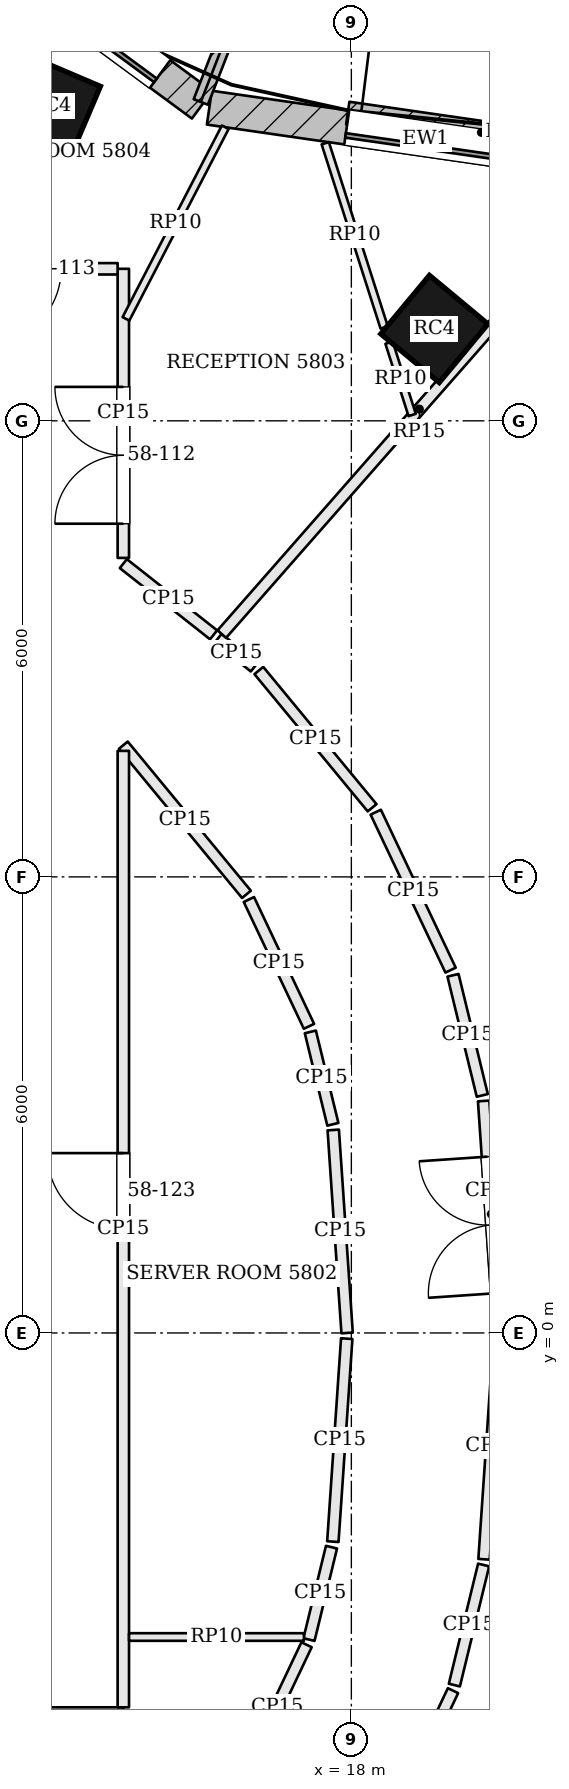
"""IFC4 building model, lengths in metres.
Left out: names, types, materials, properties, quantities, classifications, styles, units other than length and angle.
Written with IfcOpenShell. Run it as: python <this file> out.ifc"""

import sys

from ifc_helpers import new_model, si_unit, direction, frame, frame_2d, origin, origin_2d, place, context, subcontext, project, spatial, rectangle, extrude, element, fill, save


model = new_model("IFC4")
c1 = context("Model", 3, precision=1e-05, world=origin(), true_north=direction((0.0, 1.0)))
c2 = subcontext(c1, "Body", "Model", "MODEL_VIEW")
j1 = project(units=[si_unit("LENGTHUNIT", "METRE"), si_unit("PLANEANGLEUNIT", "RADIAN")], contexts=[c1])
p1 = place(None, origin())
s1 = spatial("IfcSite", under=j1, at=p1, CompositionType="ELEMENT")
p2 = place(p1, origin())
s2 = spatial("IfcBuilding", under=s1, at=p2, CompositionType="ELEMENT")
p3 = place(p2, frame((0.0, 0.0, 237.0)))
s3 = spatial("IfcBuildingStorey", under=s2, at=p3, CompositionType="ELEMENT", Elevation=237.0)
for number, where, z_axis, x_axis in (
    (1, (19.092, 13.209, 0.0), (0.0, 0.0, 1.0), (-0.769, 0.639, 0.0)),
    (2, (14.042, 16.136, 0.0), (0.0, 0.0, 1.0), (-0.92, 0.392, 0.0)),
):
    element("IfcColumn", number, at=place(p3, frame(where, z_axis=z_axis, x_axis=x_axis)), inside=s3, PredefinedType="COLUMN", context=c2, shape_type="SweptSolid", body=[
        extrude(rectangle(XDim=1.0, YDim=1.0, at=origin_2d()), origin(), (0.0, 0.0, 1.0), 3.9),
    ])
p4 = place(p3, frame((21.825, 15.297, 0.0), z_axis=(0.0, 0.0, 1.0), x_axis=(-0.98971474215, 0.143054986527, 0.0)))
e3 = element("IfcWall", 3, at=p4, inside=s3, PredefinedType="SOLIDWALL", context=c2, shape_type="SweptSolid", body=[
    extrude(rectangle(XDim=5.753, YDim=0.45, at=frame_2d((2.876, 0.0))), origin(), (0.0, 0.0, 1.0), 3.7),
])
p5 = place(p4, frame((1.826, 0.0, 0.9)))
e4 = element("IfcOpeningElement", 4, at=p5, cuts=e3, PredefinedType="OPENING", context=c2, shape_type="SweptSolid", body=[
    extrude(rectangle(XDim=2.1, YDim=2.3, at=frame_2d((1.05, 1.15))), frame((0.0, 0.235, 0.0), z_axis=(0.0, -1.0, 0.0), x_axis=(1.0, 0.0, 0.0)), (0.0, 0.0, 1.0), 0.47),
])
p6 = place(p3, frame((16.036, 16.158, 0.0), z_axis=(0.0, 0.0, 1.0), x_axis=(-0.805181432967, 0.593028549064, 0.0)))
e5 = element("IfcWall", 5, at=p6, inside=s3, PredefinedType="SOLIDWALL", context=c2, shape_type="SweptSolid", body=[
    extrude(rectangle(XDim=3.469, YDim=0.45, at=frame_2d((1.734, 0.0))), origin(), (0.0, 0.0, 1.0), 3.7),
])
p7 = place(p6, frame((0.684, 0.0, 0.9)))
e6 = element("IfcOpeningElement", 6, at=p7, cuts=e5, PredefinedType="OPENING", context=c2, shape_type="SweptSolid", body=[
    extrude(rectangle(XDim=2.1, YDim=2.3, at=frame_2d((1.05, 1.15))), frame((0.0, 0.235, 0.0), z_axis=(0.0, -1.0, 0.0), x_axis=(1.0, 0.0, 0.0)), (0.0, 0.0, 1.0), 0.47),
])
p8 = place(p3, frame((16.019, 16.195, 0.0), z_axis=(0.0, 0.0, 1.0), x_axis=(0.362641522028, 0.931928713208, 0.0)))
e7 = element("IfcWall", 7, at=p8, inside=s3, PredefinedType="SOLIDWALL", context=c2, shape_type="SweptSolid", body=[
    extrude(rectangle(XDim=1.75, YDim=0.2, at=frame_2d((0.875, 0.0))), origin(), (0.0, 0.0, 1.0), 3.7),
])
p9 = place(p3, frame((21.471, 15.541, 3.9), z_axis=(0.0, 0.0, 1.0), x_axis=(-0.989713234374, 0.143065417571, 0.0)))
e8 = element("IfcWall", 8, at=p9, inside=s3, PredefinedType="PARAPET", context=c2, shape_type="SweptSolid", body=[
    extrude(rectangle(XDim=3.555, YDim=0.3, at=frame_2d((1.777, 0.0))), origin(), (0.0, 0.0, 1.0), 1.1),
])
p10 = place(p3, frame((18.353, -6.784, 0.0), z_axis=(0.0, 0.0, 1.0), x_axis=(0.428086344739, 0.903737838894, 0.0)))
e9 = element("IfcWall", 9, at=p10, inside=s3, PredefinedType="PARTITIONING", context=c2, shape_type="SweptSolid", body=[
    extrude(rectangle(XDim=2.3, YDim=0.15, at=frame_2d((1.15, 0.0))), origin(), (0.0, 0.0, 1.0), 3.084),
])
p11 = place(p3, frame((19.355, -4.633, 0.0), z_axis=(0.0, 0.0, 1.0), x_axis=(0.236703930685, 0.971581828359, 0.0)))
e10 = element("IfcWall", 10, at=p11, inside=s3, PredefinedType="PARTITIONING", context=c2, shape_type="SweptSolid", body=[
    extrude(rectangle(XDim=1.626, YDim=0.15, at=frame_2d((0.813, 0.0))), origin(), (0.0, 0.0, 1.0), 3.084),
])
p12 = place(p3, frame((19.745, -2.978, 0.0), z_axis=(0.0, 0.0, 1.0), x_axis=(0.068142324, 0.997675610447, 0.0)))
e11 = element("IfcWall", 11, at=p12, inside=s3, PredefinedType="PARTITIONING", context=c2, shape_type="SweptSolid", body=[
    extrude(rectangle(XDim=2.984, YDim=0.15, at=frame_2d((1.492, 0.0))), origin(), (0.0, 0.0, 1.0), 3.084),
])
p13 = place(p3, frame((19.944, 0.075, 0.0), z_axis=(0.0, 0.0, 1.0), x_axis=(-0.068136763128, 0.997675990245, 0.0)))
e12 = element("IfcWall", 12, at=p13, inside=s3, PredefinedType="PARTITIONING", context=c2, shape_type="SweptSolid", body=[
    extrude(rectangle(XDim=2.985, YDim=0.15, at=frame_2d((1.492, 0.0))), origin(), (0.0, 0.0, 1.0), 3.084),
])
p14 = place(p13, frame((0.45, 0.0, 0.0)))
e13 = element("IfcOpeningElement", 13, at=p14, cuts=e12, PredefinedType="OPENING", context=c2, shape_type="SweptSolid", body=[
    extrude(rectangle(XDim=1.8, YDim=2.1, at=frame_2d((0.9, 1.05))), frame((0.0, 0.085, 0.0), z_axis=(0.0, -1.0, 0.0), x_axis=(1.0, 0.0, 0.0)), (0.0, 0.0, 1.0), 0.17),
])
p15 = place(p3, frame((19.722, 3.125, 0.0), z_axis=(0.0, 0.0, 1.0), x_axis=(-0.236703930685, 0.971581828359, 0.0)))
e14 = element("IfcWall", 14, at=p15, inside=s3, PredefinedType="PARTITIONING", context=c2, shape_type="SweptSolid", body=[
    extrude(rectangle(XDim=1.626, YDim=0.15, at=frame_2d((0.813, 0.0))), origin(), (0.0, 0.0, 1.0), 3.084),
])
p16 = place(p3, frame((19.305, 4.773, 0.0), z_axis=(0.0, 0.0, 1.0), x_axis=(-0.428173054138, 0.903696760927, 0.0)))
e15 = element("IfcWall", 15, at=p16, inside=s3, PredefinedType="PARTITIONING", context=c2, shape_type="SweptSolid", body=[
    extrude(rectangle(XDim=2.3, YDim=0.15, at=frame_2d((1.15, 0.0))), origin(), (0.0, 0.0, 1.0), 3.084),
])
p17 = place(p3, frame((18.273, 6.909, 0.0), z_axis=(0.0, 0.0, 1.0), x_axis=(-0.63653648943, 0.771246586783, 0.0)))
e16 = element("IfcWall", 16, at=p17, inside=s3, PredefinedType="PARTITIONING", context=c2, shape_type="SweptSolid", body=[
    extrude(rectangle(XDim=2.342, YDim=0.15, at=frame_2d((1.171, 0.0))), origin(), (0.0, 0.0, 1.0), 3.084),
])
p18 = place(p3, frame((16.724, 8.761, 0.0), z_axis=(0.0, 0.0, 1.0), x_axis=(-0.785119021736, 0.619344913363, 0.0)))
e17 = element("IfcWall", 17, at=p18, inside=s3, PredefinedType="PARTITIONING", context=c2, shape_type="SweptSolid", body=[
    extrude(rectangle(XDim=0.608, YDim=0.15, at=frame_2d((0.304, 0.0))), origin(), (0.0, 0.0, 1.0), 3.084),
])
p19 = place(p3, frame((21.493, 15.114, 0.0), z_axis=(0.0, 0.0, 1.0), x_axis=(-0.659778549164, -0.751460089467, 0.0)))
e18 = element("IfcWall", 18, at=p19, inside=s3, PredefinedType="PARTITIONING", context=c2, shape_type="SweptSolid", body=[
    extrude(rectangle(XDim=7.877, YDim=0.15, at=frame_2d((3.938, 0.0))), origin(), (0.0, 0.0, 1.0), 3.184),
])
p20 = place(p3, frame((16.188, 9.185, 0.0), z_axis=(0.0, 0.0, 1.0), x_axis=(-0.785118219188, 0.61934593072, 0.0)))
e19 = element("IfcWall", 19, at=p20, inside=s3, PredefinedType="PARTITIONING", context=c2, shape_type="SweptSolid", body=[
    extrude(rectangle(XDim=1.512, YDim=0.15, at=frame_2d((0.756, 0.0))), origin(), (0.0, 0.0, 1.0), 3.084),
])
p21 = place(p3, frame((15.0, 10.196, 0.0), z_axis=(0.0, 0.0, 1.0), x_axis=(0.0, 1.0, 0.0)))
e20 = element("IfcWall", 20, at=p21, inside=s3, PredefinedType="PARTITIONING", context=c2, shape_type="SweptSolid", body=[
    extrude(rectangle(XDim=3.804, YDim=0.15, at=frame_2d((1.902, 0.0))), origin(), (0.0, 0.0, 1.0), 3.084),
])
p22 = place(p21, frame((0.45, 0.0, 0.0)))
e21 = element("IfcOpeningElement", 21, at=p22, cuts=e20, PredefinedType="OPENING", context=c2, shape_type="SweptSolid", body=[
    extrude(rectangle(XDim=1.8, YDim=2.1, at=frame_2d((0.9, 1.05))), frame((0.0, 0.085, 0.0), z_axis=(0.0, -1.0, 0.0), x_axis=(1.0, 0.0, 0.0)), (0.0, 0.0, 1.0), 0.17),
])
p23 = place(p3, frame((14.925, 14.0, 0.0), z_axis=(0.0, 0.0, 1.0), x_axis=(-1.0, 0.0, 0.0)))
e22 = element("IfcWall", 22, at=p23, inside=s3, PredefinedType="PARTITIONING", context=c2, shape_type="SweptSolid", body=[
    extrude(rectangle(XDim=17.65, YDim=0.15, at=frame_2d((8.825, 0.0))), origin(), (0.0, 0.0, 1.0), 3.084),
])
p24 = place(p23, frame((0.743, 0.0, 0.0)))
e23 = element("IfcOpeningElement", 23, at=p24, cuts=e22, PredefinedType="OPENING", context=c2, shape_type="SweptSolid", body=[
    extrude(rectangle(XDim=1.0, YDim=2.4, at=frame_2d((0.5, 1.2))), frame((0.0, 0.085, 0.0), z_axis=(0.0, -1.0, 0.0), x_axis=(1.0, 0.0, 0.0)), (0.0, 0.0, 1.0), 0.17),
])
p25 = place(p23, frame((4.127, 0.0, 0.0)))
e24 = element("IfcOpeningElement", 24, at=p25, cuts=e22, PredefinedType="OPENING", context=c2, shape_type="SweptSolid", body=[
    extrude(rectangle(XDim=1.0, YDim=2.4, at=frame_2d((0.5, 1.2))), frame((0.0, 0.085, 0.0), z_axis=(0.0, -1.0, 0.0), x_axis=(1.0, 0.0, 0.0)), (0.0, 0.0, 1.0), 0.17),
])
p26 = place(p23, frame((8.325, 0.0, 0.0)))
e25 = element("IfcOpeningElement", 25, at=p26, cuts=e22, PredefinedType="OPENING", context=c2, shape_type="SweptSolid", body=[
    extrude(rectangle(XDim=1.0, YDim=2.4, at=frame_2d((0.5, 1.2))), frame((0.0, 0.085, 0.0), z_axis=(0.0, -1.0, 0.0), x_axis=(1.0, 0.0, 0.0)), (0.0, 0.0, 1.0), 0.17),
])
p27 = place(p23, frame((12.75, 0.0, 0.0)))
e26 = element("IfcOpeningElement", 26, at=p27, cuts=e22, PredefinedType="OPENING", context=c2, shape_type="SweptSolid", body=[
    extrude(rectangle(XDim=0.9, YDim=2.1, at=frame_2d((0.45, 1.05))), frame((0.0, 0.085, 0.0), z_axis=(0.0, -1.0, 0.0), x_axis=(1.0, 0.0, 0.0)), (0.0, 0.0, 1.0), 0.17),
])
p28 = place(p23, frame((15.65, 0.0, 0.0)))
e27 = element("IfcOpeningElement", 27, at=p28, cuts=e22, PredefinedType="OPENING", context=c2, shape_type="SweptSolid", body=[
    extrude(rectangle(XDim=0.9, YDim=2.1, at=frame_2d((0.45, 1.05))), frame((0.0, 0.085, 0.0), z_axis=(0.0, -1.0, 0.0), x_axis=(1.0, 0.0, 0.0)), (0.0, 0.0, 1.0), 0.17),
])
p29 = place(p3, frame((15.0, 7.733, 0.0), z_axis=(0.0, 0.0, 1.0), x_axis=(0.636601263488, -0.771193121938, 0.0)))
e28 = element("IfcWall", 28, at=p29, inside=s3, PredefinedType="PARTITIONING", context=c2, shape_type="SweptSolid", body=[
    extrude(rectangle(XDim=2.545, YDim=0.15, at=frame_2d((1.272, 0.0))), origin(), (0.0, 0.0, 1.0), 3.084),
])
p30 = place(p3, frame((16.652, 5.702, 0.0), z_axis=(0.0, 0.0, 1.0), x_axis=(0.428126129773, -0.903718992279, 0.0)))
e29 = element("IfcWall", 29, at=p30, inside=s3, PredefinedType="PARTITIONING", context=c2, shape_type="SweptSolid", body=[
    extrude(rectangle(XDim=1.846, YDim=0.15, at=frame_2d((0.923, 0.0))), origin(), (0.0, 0.0, 1.0), 3.084),
])
p31 = place(p3, frame((17.46, 3.961, 0.0), z_axis=(0.0, 0.0, 1.0), x_axis=(0.236655249498, -0.971593687137, 0.0)))
e30 = element("IfcWall", 30, at=p31, inside=s3, PredefinedType="PARTITIONING", context=c2, shape_type="SweptSolid", body=[
    extrude(rectangle(XDim=1.251, YDim=0.15, at=frame_2d((0.626, 0.0))), origin(), (0.0, 0.0, 1.0), 3.084),
])
p32 = place(p3, frame((17.762, 2.67, 0.0), z_axis=(0.0, 0.0, 1.0), x_axis=(0.068135311644, -0.997676089373, 0.0)))
e31 = element("IfcWall", 31, at=p32, inside=s3, PredefinedType="PARTITIONING", context=c2, shape_type="SweptSolid", body=[
    extrude(rectangle(XDim=2.677, YDim=0.15, at=frame_2d((1.338, 0.0))), origin(), (0.0, 0.0, 1.0), 3.084),
])
p33 = place(p3, frame((17.939, -0.075, 0.0), z_axis=(0.0, 0.0, 1.0), x_axis=(-0.068226099283, -0.99766988497, 0.0)))
e32 = element("IfcWall", 32, at=p33, inside=s3, PredefinedType="PARTITIONING", context=c2, shape_type="SweptSolid", body=[
    extrude(rectangle(XDim=2.677, YDim=0.15, at=frame_2d((1.338, 0.0))), origin(), (0.0, 0.0, 1.0), 3.084),
])
p34 = place(p3, frame((17.739, -2.818, 0.0), z_axis=(0.0, 0.0, 1.0), x_axis=(-0.236884307907, -0.971537865792, 0.0)))
e33 = element("IfcWall", 33, at=p34, inside=s3, PredefinedType="PARTITIONING", context=c2, shape_type="SweptSolid", body=[
    extrude(rectangle(XDim=1.251, YDim=0.15, at=frame_2d((0.625, 0.0))), origin(), (0.0, 0.0, 1.0), 3.084),
])
p35 = place(p3, frame((17.41, -4.102, 0.0), z_axis=(0.0, 0.0, 1.0), x_axis=(-0.428074720318, -0.903743345107, 0.0)))
e34 = element("IfcWall", 34, at=p35, inside=s3, PredefinedType="PARTITIONING", context=c2, shape_type="SweptSolid", body=[
    extrude(rectangle(XDim=1.806, YDim=0.15, at=frame_2d((0.903, 0.0))), origin(), (0.0, 0.0, 1.0), 3.084),
])
p36 = place(p3, frame((-14.925, -5.0, 0.0), z_axis=(0.0, 0.0, 1.0), x_axis=(1.0, 0.0, 0.0)))
e35 = element("IfcWall", 35, at=p36, inside=s3, PredefinedType="PARTITIONING", context=c2, shape_type="SweptSolid", body=[
    extrude(rectangle(XDim=29.925, YDim=0.15, at=frame_2d((14.962, 0.0))), origin(), (0.0, 0.0, 1.0), 3.084),
])
p37 = place(p36, frame((2.175, 0.0, 0.0)))
e36 = element("IfcOpeningElement", 36, at=p37, cuts=e35, PredefinedType="OPENING", context=c2, shape_type="SweptSolid", body=[
    extrude(rectangle(XDim=1.0, YDim=2.4, at=frame_2d((0.5, 1.2))), frame((0.0, 0.085, 0.0), z_axis=(0.0, -1.0, 0.0), x_axis=(1.0, 0.0, 0.0)), (0.0, 0.0, 1.0), 0.17),
])
p38 = place(p36, frame((14.025, 0.0, 0.0)))
e37 = element("IfcOpeningElement", 37, at=p38, cuts=e35, PredefinedType="OPENING", context=c2, shape_type="SweptSolid", body=[
    extrude(rectangle(XDim=1.8, YDim=2.1, at=frame_2d((0.9, 1.05))), frame((0.0, 0.085, 0.0), z_axis=(0.0, -1.0, 0.0), x_axis=(1.0, 0.0, 0.0)), (0.0, 0.0, 1.0), 0.17),
])
p39 = place(p36, frame((26.825, 0.0, 0.0)))
e38 = element("IfcOpeningElement", 38, at=p39, cuts=e35, PredefinedType="OPENING", context=c2, shape_type="SweptSolid", body=[
    extrude(rectangle(XDim=0.7, YDim=2.1, at=frame_2d((0.35, 1.05))), frame((0.0, 0.085, 0.0), z_axis=(0.0, -1.0, 0.0), x_axis=(1.0, 0.0, 0.0)), (0.0, 0.0, 1.0), 0.17),
])
p40 = place(p3, frame((15.0, -4.925, 0.0), z_axis=(0.0, 0.0, 1.0), x_axis=(0.0, 1.0, 0.0)))
e39 = element("IfcWall", 39, at=p40, inside=s3, PredefinedType="PARTITIONING", context=c2, shape_type="SweptSolid", body=[
    extrude(rectangle(XDim=12.583, YDim=0.15, at=frame_2d((6.292, 0.0))), origin(), (0.0, 0.0, 1.0), 3.084),
])
p41 = place(p40, frame((6.291, 0.0, 0.0)))
e40 = element("IfcOpeningElement", 40, at=p41, cuts=e39, PredefinedType="OPENING", context=c2, shape_type="SweptSolid", body=[
    extrude(rectangle(XDim=1.0, YDim=2.1, at=frame_2d((0.5, 1.05))), frame((0.0, 0.085, 0.0), z_axis=(0.0, -1.0, 0.0), x_axis=(1.0, 0.0, 0.0)), (0.0, 0.0, 1.0), 0.17),
])
p42 = place(p3, frame((17.656, 15.652, 0.0), z_axis=(0.0, 0.0, 1.0), x_axis=(0.304692182397, -0.952450877466, 0.0)))
e41 = element("IfcWall", 41, at=p42, inside=s3, PredefinedType="PARTITIONING", context=c2, shape_type="SweptSolid", body=[
    extrude(rectangle(XDim=2.545, YDim=0.1, at=frame_2d((1.272, 0.0))), origin(), (0.0, 0.0, 1.0), 3.084),
])
p43 = place(p3, frame((18.496, 13.029, 0.0), z_axis=(0.0, 0.0, 1.0), x_axis=(0.304695933272, -0.952449677541, 0.0)))
e42 = element("IfcWall", 42, at=p43, inside=s3, PredefinedType="PARTITIONING", context=c2, shape_type="SweptSolid", body=[
    extrude(rectangle(XDim=0.999, YDim=0.1, at=frame_2d((0.5, 0.0))), origin(), (0.0, 0.0, 1.0), 3.084),
])
p44 = place(p3, frame((15.034, 13.341, 0.0), z_axis=(0.0, 0.0, 1.0), x_axis=(0.460131451108, 0.887850802614, 0.0)))
e43 = element("IfcWall", 43, at=p44, inside=s3, PredefinedType="PARTITIONING", context=c2, shape_type="SweptSolid", body=[
    extrude(rectangle(XDim=2.84, YDim=0.1, at=frame_2d((1.42, 0.0))), origin(), (0.0, 0.0, 1.0), 3.084),
])
p45 = place(p3, frame((15.075, -4.0, 0.0), z_axis=(0.0, 0.0, 1.0), x_axis=(1.0, 0.0, 0.0)))
e44 = element("IfcWall", 44, at=p45, inside=s3, PredefinedType="PARTITIONING", context=c2, shape_type="SweptSolid", body=[
    extrude(rectangle(XDim=2.301, YDim=0.1, at=frame_2d((1.15, 0.0))), origin(), (0.0, 0.0, 1.0), 3.084),
])
p46 = place(p5, origin())
e45 = element("IfcWindow", 45, at=p46, inside=s3, PartitioningType="SINGLE_PANEL", PredefinedType="WINDOW", context=c2, shape_type="SweptSolid", body=[
    extrude(rectangle(XDim=2.1, YDim=2.3, at=frame_2d((1.05, 1.15))), frame((0.0, 0.135, 0.0), z_axis=(0.0, -1.0, 0.0), x_axis=(1.0, 0.0, 0.0)), (0.0, 0.0, 1.0), 0.06),
])
fill(e4, e45)
p47 = place(p7, origin())
e46 = element("IfcWindow", 46, at=p47, inside=s3, PartitioningType="SINGLE_PANEL", PredefinedType="WINDOW", context=c2, shape_type="SweptSolid", body=[
    extrude(rectangle(XDim=2.1, YDim=2.3, at=frame_2d((1.05, 1.15))), frame((0.0, 0.135, 0.0), z_axis=(0.0, -1.0, 0.0), x_axis=(1.0, 0.0, 0.0)), (0.0, 0.0, 1.0), 0.06),
])
fill(e6, e46)
p48 = place(p14, origin())
e47 = element("IfcDoor", 47, at=p48, inside=s3, OperationType="DOUBLE_DOOR_SINGLE_SWING", PredefinedType="DOOR", context=c2, shape_type="SweptSolid", body=[
    extrude(rectangle(XDim=1.8, YDim=2.1, at=frame_2d((0.9, 1.05))), frame((0.0, 0.025, 0.0), z_axis=(0.0, -1.0, 0.0), x_axis=(1.0, 0.0, 0.0)), (0.0, 0.0, 1.0), 0.05),
])
fill(e13, e47)
p49 = place(p22, origin())
e48 = element("IfcDoor", 48, at=p49, inside=s3, OperationType="DOUBLE_DOOR_SINGLE_SWING", PredefinedType="DOOR", context=c2, shape_type="SweptSolid", body=[
    extrude(rectangle(XDim=1.8, YDim=2.1, at=frame_2d((0.9, 1.05))), frame((0.0, 0.025, 0.0), z_axis=(0.0, -1.0, 0.0), x_axis=(1.0, 0.0, 0.0)), (0.0, 0.0, 1.0), 0.05),
])
fill(e21, e48)
p50 = place(p24, origin())
e49 = element("IfcDoor", 49, at=p50, inside=s3, OperationType="SINGLE_SWING_RIGHT", PredefinedType="DOOR", context=c2, shape_type="SweptSolid", body=[
    extrude(rectangle(XDim=1.0, YDim=2.4, at=frame_2d((0.5, 1.2))), frame((0.0, 0.025, 0.0), z_axis=(0.0, -1.0, 0.0), x_axis=(1.0, 0.0, 0.0)), (0.0, 0.0, 1.0), 0.05),
])
fill(e23, e49)
p51 = place(p41, origin())
e50 = element("IfcDoor", 50, at=p51, inside=s3, OperationType="SINGLE_SWING_RIGHT", PredefinedType="DOOR", context=c2, shape_type="SweptSolid", body=[
    extrude(rectangle(XDim=1.0, YDim=2.1, at=frame_2d((0.5, 1.05))), frame((0.0, 0.025, 0.0), z_axis=(0.0, -1.0, 0.0), x_axis=(1.0, 0.0, 0.0)), (0.0, 0.0, 1.0), 0.05),
])
fill(e40, e50)
save(model, sys.argv[1])
